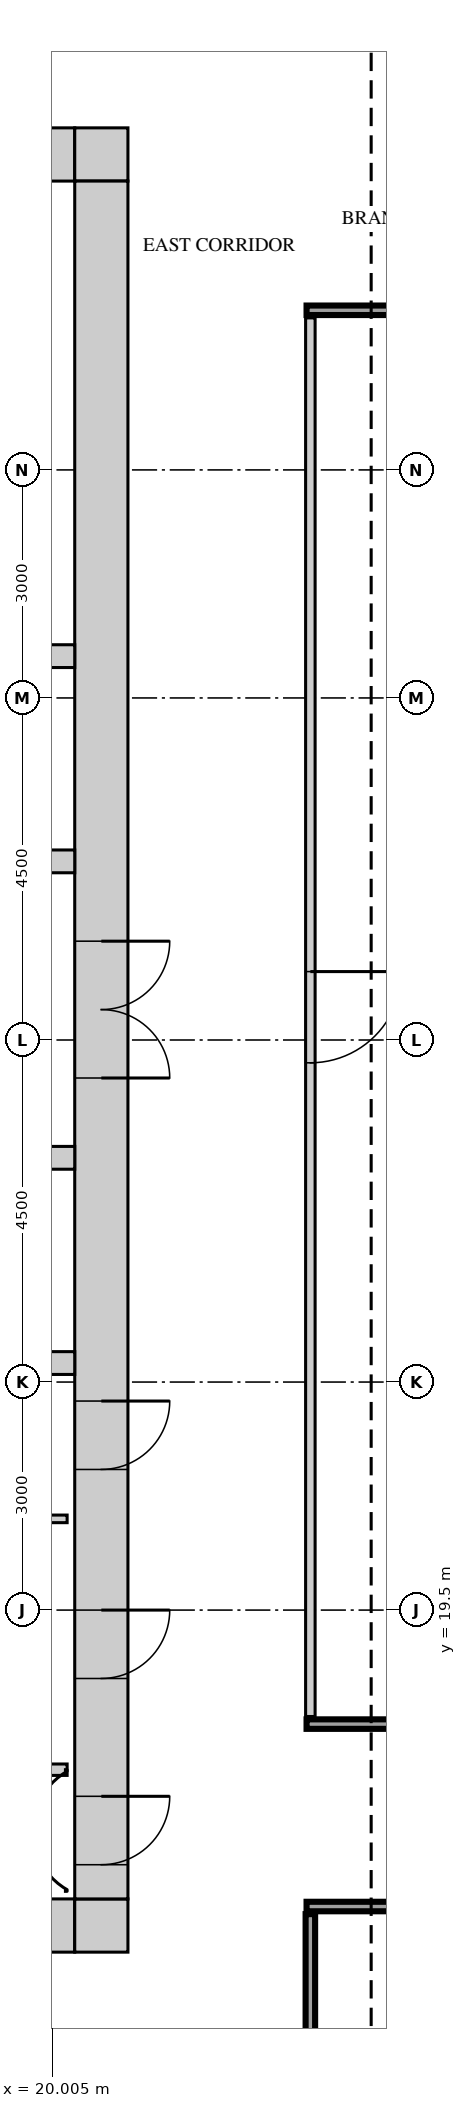
"""IFC4 building model, lengths in metres.
Left out: names, types, materials, properties, quantities, classifications, styles, units other than length and angle.
Written with IfcOpenShell. Run it as: python <this file> out.ifc"""

import sys

from ifc_helpers import new_model, si_unit, direction, frame, frame_2d, origin, place, context, subcontext, project, spatial, rectangle, extrude, source, transform, mapped, element, fill, save


model = new_model("IFC4")
c1 = context("Model", 3, precision=1e-05, world=origin(), true_north=direction((0.0, 1.0)))
c2 = subcontext(c1, "Body", "Model", "MODEL_VIEW")
j1 = project(units=[si_unit("LENGTHUNIT", "METRE"), si_unit("PLANEANGLEUNIT", "RADIAN")], contexts=[c1])
p1 = place(None, origin())
s1 = spatial("IfcSite", under=j1, at=p1, CompositionType="ELEMENT")
p2 = place(p1, origin())
s2 = spatial("IfcBuilding", under=s1, at=p2, CompositionType="ELEMENT")
p3 = place(p2, frame((0.0, 0.0, 230.2)))
s3 = spatial("IfcBuildingStorey", under=s2, at=p3, CompositionType="ELEMENT", Elevation=230.2)
m1 = source(origin(), c2, "Body", "SweptSolid", [
    extrude(rectangle(XDim=13.6, YDim=0.7, at=frame_2d((6.8, 0.0))), origin(), (0.0, 0.0, 1.0), 3.75),
])
p4 = place(p3, frame((6.7, 38.65, 0.0), z_axis=(0.0, 0.0, 1.0), x_axis=(1.0, 0.0, 0.0)))
e1 = element("IfcWall", 1, at=p4, inside=s3, PredefinedType="SHEAR", context=c2, shape_type="MappedRepresentation", body=[
    mapped(m1, transform((0.0, 0.0, 0.0))),
])
m2 = source(origin(), c2, "Body", "SweptSolid", [
    extrude(rectangle(XDim=0.9, YDim=2.1, at=frame_2d((0.45, 1.05))), frame((0.0, 0.36, 0.0), z_axis=(0.0, -1.0, 0.0), x_axis=(1.0, 0.0, 0.0)), (0.0, 0.0, 1.0), 0.72),
])
p5 = place(p4, frame((3.0, 0.0, 0.0)))
e2 = element("IfcOpeningElement", 2, at=p5, cuts=e1, PredefinedType="OPENING", context=c2, shape_type="MappedRepresentation", body=[
    mapped(m2, transform((0.0, 0.0, 0.0))),
])
p6 = place(p4, frame((9.7, 0.0, 0.0)))
e3 = element("IfcOpeningElement", 3, at=p6, cuts=e1, PredefinedType="OPENING", context=c2, shape_type="MappedRepresentation", body=[
    mapped(m2, transform((0.0, 0.0, 0.0))),
])
m3 = source(origin(), c2, "Body", "SweptSolid", [
    extrude(rectangle(XDim=0.7, YDim=0.7, at=frame_2d((0.35, 0.0))), origin(), (0.0, 0.0, 1.0), 3.75),
])
p7 = place(p3, frame((20.3, 38.65, 0.0), z_axis=(0.0, 0.0, 1.0), x_axis=(1.0, 0.0, 0.0)))
e4 = element("IfcWall", 4, at=p7, inside=s3, PredefinedType="SHEAR", context=c2, shape_type="MappedRepresentation", body=[
    mapped(m3, transform((0.0, 0.0, 0.0))),
])
p8 = place(p3, frame((6.7, 15.35, 0.0), z_axis=(0.0, 0.0, 1.0), x_axis=(1.0, 0.0, 0.0)))
e5 = element("IfcWall", 5, at=p8, inside=s3, PredefinedType="SHEAR", context=c2, shape_type="MappedRepresentation", body=[
    mapped(m1, transform((0.0, 0.0, 0.0))),
])
m4 = source(origin(), c2, "Body", "SweptSolid", [
    extrude(rectangle(XDim=1.2, YDim=2.1, at=frame_2d((0.6, 1.05))), frame((0.0, 0.36, 0.0), z_axis=(0.0, -1.0, 0.0), x_axis=(1.0, 0.0, 0.0)), (0.0, 0.0, 1.0), 0.72),
])
p9 = place(p8, frame((5.5, 0.0, 0.0)))
e6 = element("IfcOpeningElement", 6, at=p9, cuts=e5, PredefinedType="OPENING", context=c2, shape_type="MappedRepresentation", body=[
    mapped(m4, transform((0.0, 0.0, 0.0))),
])
p10 = place(p8, frame((2.15, 0.0, 0.0)))
e7 = element("IfcOpeningElement", 7, at=p10, cuts=e5, PredefinedType="OPENING", context=c2, shape_type="MappedRepresentation", body=[
    mapped(m4, transform((0.0, 0.0, 0.0))),
])
m5 = source(origin(), c2, "Body", "SweptSolid", [
    extrude(rectangle(XDim=1.0, YDim=2.1, at=frame_2d((0.5, 1.05))), frame((0.0, 0.36, 0.0), z_axis=(0.0, -1.0, 0.0), x_axis=(1.0, 0.0, 0.0)), (0.0, 0.0, 1.0), 0.72),
])
p11 = place(p8, frame((8.0, 0.0, 0.0)))
e8 = element("IfcOpeningElement", 8, at=p11, cuts=e5, PredefinedType="OPENING", context=c2, shape_type="MappedRepresentation", body=[
    mapped(m5, transform((0.0, 0.0, 0.0))),
])
p12 = place(p3, frame((20.3, 15.35, 0.0), z_axis=(0.0, 0.0, 1.0), x_axis=(1.0, 0.0, 0.0)))
e9 = element("IfcWall", 9, at=p12, inside=s3, PredefinedType="SHEAR", context=c2, shape_type="MappedRepresentation", body=[
    mapped(m3, transform((0.0, 0.0, 0.0))),
])
m6 = source(origin(), c2, "Body", "SweptSolid", [
    extrude(rectangle(XDim=22.6, YDim=0.7, at=frame_2d((11.3, 0.0))), origin(), (0.0, 0.0, 1.0), 3.75),
])
p13 = place(p3, frame((20.65, 15.7, 0.0), z_axis=(0.0, 0.0, 1.0), x_axis=(0.0, 1.0, 0.0)))
e10 = element("IfcWall", 10, at=p13, inside=s3, PredefinedType="SHEAR", context=c2, shape_type="MappedRepresentation", body=[
    mapped(m6, transform((0.0, 0.0, 0.0))),
])
m7 = source(origin(), c2, "Body", "SweptSolid", [
    extrude(rectangle(XDim=1.8, YDim=2.1, at=frame_2d((0.9, 1.05))), frame((0.0, 0.36, 0.0), z_axis=(0.0, -1.0, 0.0), x_axis=(1.0, 0.0, 0.0)), (0.0, 0.0, 1.0), 0.72),
])
p14 = place(p13, frame((10.8, 0.0, 0.0)))
e11 = element("IfcOpeningElement", 11, at=p14, cuts=e10, PredefinedType="OPENING", context=c2, shape_type="MappedRepresentation", body=[
    mapped(m7, transform((0.0, 0.0, 0.0))),
])
p15 = place(p13, frame((0.45, 0.0, 0.0)))
e12 = element("IfcOpeningElement", 12, at=p15, cuts=e10, PredefinedType="OPENING", context=c2, shape_type="MappedRepresentation", body=[
    mapped(m2, transform((0.0, 0.0, 0.0))),
])
p16 = place(p13, frame((2.9, 0.0, 0.0)))
e13 = element("IfcOpeningElement", 13, at=p16, cuts=e10, PredefinedType="OPENING", context=c2, shape_type="MappedRepresentation", body=[
    mapped(m2, transform((0.0, 0.0, 0.0))),
])
p17 = place(p13, frame((5.65, 0.0, 0.0)))
e14 = element("IfcOpeningElement", 14, at=p17, cuts=e10, PredefinedType="OPENING", context=c2, shape_type="MappedRepresentation", body=[
    mapped(m2, transform((0.0, 0.0, 0.0))),
])
m8 = source(origin(), c2, "Body", "SweptSolid", [
    extrude(rectangle(XDim=13.6, YDim=0.3, at=frame_2d((6.8, 0.0))), origin(), (0.0, 0.0, 1.0), 3.75),
])
for number, where, z_axis, x_axis in (
    (15, (6.7, 22.75, 0.0), (0.0, 0.0, 1.0), (1.0, 0.0, 0.0)),
    (16, (6.7, 32.05, 0.0), (0.0, 0.0, 1.0), (1.0, 0.0, 0.0)),
):
    element("IfcWall", number, at=place(p3, frame(where, z_axis=z_axis, x_axis=x_axis)), inside=s3, PredefinedType="STANDARD", context=c2, shape_type="MappedRepresentation", body=[
        mapped(m8, transform((0.0, 0.0, 0.0))),
    ])
p18 = place(p3, frame((6.7, 29.35, 0.0), z_axis=(0.0, 0.0, 1.0), x_axis=(1.0, 0.0, 0.0)))
e17 = element("IfcWall", 17, at=p18, inside=s3, PredefinedType="STANDARD", context=c2, shape_type="MappedRepresentation", body=[
    mapped(m8, transform((0.0, 0.0, 0.0))),
])
m9 = source(origin(), c2, "Body", "SweptSolid", [
    extrude(rectangle(XDim=1.2, YDim=2.1, at=frame_2d((0.6, 1.05))), frame((0.0, 0.16, 0.0), z_axis=(0.0, -1.0, 0.0), x_axis=(1.0, 0.0, 0.0)), (0.0, 0.0, 1.0), 0.32),
])
p19 = place(p18, frame((1.05, 0.0, 0.0)))
e18 = element("IfcOpeningElement", 18, at=p19, cuts=e17, PredefinedType="OPENING", context=c2, shape_type="MappedRepresentation", body=[
    mapped(m9, transform((0.0, 0.0, 0.0))),
])
p20 = place(p18, frame((3.6, 0.0, 0.0)))
e19 = element("IfcOpeningElement", 19, at=p20, cuts=e17, PredefinedType="OPENING", context=c2, shape_type="MappedRepresentation", body=[
    mapped(m9, transform((0.0, 0.0, 0.0))),
])
p21 = place(p18, frame((6.15, 0.0, 0.0)))
e20 = element("IfcOpeningElement", 20, at=p21, cuts=e17, PredefinedType="OPENING", context=c2, shape_type="MappedRepresentation", body=[
    mapped(m9, transform((0.0, 0.0, 0.0))),
])
p22 = place(p18, frame((8.7, 0.0, 0.0)))
e21 = element("IfcOpeningElement", 21, at=p22, cuts=e17, PredefinedType="OPENING", context=c2, shape_type="MappedRepresentation", body=[
    mapped(m9, transform((0.0, 0.0, 0.0))),
])
p23 = place(p18, frame((11.25, 0.0, 0.0)))
e22 = element("IfcOpeningElement", 22, at=p23, cuts=e17, PredefinedType="OPENING", context=c2, shape_type="MappedRepresentation", body=[
    mapped(m9, transform((0.0, 0.0, 0.0))),
])
p24 = place(p3, frame((6.7, 25.45, 0.0), z_axis=(0.0, 0.0, 1.0), x_axis=(1.0, 0.0, 0.0)))
e23 = element("IfcWall", 23, at=p24, inside=s3, PredefinedType="STANDARD", context=c2, shape_type="MappedRepresentation", body=[
    mapped(m8, transform((0.0, 0.0, 0.0))),
])
p25 = place(p24, frame((1.05, 0.0, 0.0)))
e24 = element("IfcOpeningElement", 24, at=p25, cuts=e23, PredefinedType="OPENING", context=c2, shape_type="MappedRepresentation", body=[
    mapped(m9, transform((0.0, 0.0, 0.0))),
])
p26 = place(p24, frame((3.6, 0.0, 0.0)))
e25 = element("IfcOpeningElement", 25, at=p26, cuts=e23, PredefinedType="OPENING", context=c2, shape_type="MappedRepresentation", body=[
    mapped(m9, transform((0.0, 0.0, 0.0))),
])
p27 = place(p24, frame((6.15, 0.0, 0.0)))
e26 = element("IfcOpeningElement", 26, at=p27, cuts=e23, PredefinedType="OPENING", context=c2, shape_type="MappedRepresentation", body=[
    mapped(m9, transform((0.0, 0.0, 0.0))),
])
p28 = place(p24, frame((8.7, 0.0, 0.0)))
e27 = element("IfcOpeningElement", 27, at=p28, cuts=e23, PredefinedType="OPENING", context=c2, shape_type="MappedRepresentation", body=[
    mapped(m9, transform((0.0, 0.0, 0.0))),
])
p29 = place(p24, frame((11.25, 0.0, 0.0)))
e28 = element("IfcOpeningElement", 28, at=p29, cuts=e23, PredefinedType="OPENING", context=c2, shape_type="MappedRepresentation", body=[
    mapped(m9, transform((0.0, 0.0, 0.0))),
])
m10 = source(origin(), c2, "Body", "SweptSolid", [
    extrude(rectangle(XDim=10.85, YDim=0.125, at=frame_2d((5.425, 0.0))), origin(), (0.0, 0.0, 1.0), 3.8),
])
p30 = place(p3, frame((23.4, 4.65, 0.0), z_axis=(0.0, 0.0, 1.0), x_axis=(0.0, 1.0, 0.0)))
e29 = element("IfcWall", 29, at=p30, inside=s3, PredefinedType="PARTITIONING", context=c2, shape_type="MappedRepresentation", body=[
    mapped(m10, transform((0.0, 0.0, 0.0))),
])
m11 = source(origin(), c2, "Body", "SweptSolid", [
    extrude(rectangle(XDim=0.9, YDim=2.1, at=frame_2d((0.45, 1.05))), frame((0.0, 0.073, 0.0), z_axis=(0.0, -1.0, 0.0), x_axis=(1.0, 0.0, 0.0)), (0.0, 0.0, 1.0), 0.145),
])
p31 = place(p30, frame((4.5, 0.0, 0.0)))
e30 = element("IfcOpeningElement", 30, at=p31, cuts=e29, PredefinedType="OPENING", context=c2, shape_type="MappedRepresentation", body=[
    mapped(m11, transform((0.0, 0.0, 0.0))),
])
m12 = source(origin(), c2, "Body", "SweptSolid", [
    extrude(rectangle(XDim=26.0, YDim=0.125, at=frame_2d((13.0, 0.0))), origin(), (0.0, 0.0, 1.0), 3.8),
])
p32 = place(p3, frame((23.35, 15.6, 0.0), z_axis=(0.0, 0.0, 1.0), x_axis=(1.0, 0.0, 0.0)))
e31 = element("IfcWall", 31, at=p32, inside=s3, PredefinedType="PARTITIONING", context=c2, shape_type="MappedRepresentation", body=[
    mapped(m12, transform((0.0, 0.0, 0.0))),
])
p33 = place(p32, frame((4.05, 0.0, 0.0)))
e32 = element("IfcOpeningElement", 32, at=p33, cuts=e31, PredefinedType="OPENING", context=c2, shape_type="MappedRepresentation", body=[
    mapped(m11, transform((0.0, 0.0, 0.0))),
])
m13 = source(origin(), c2, "Body", "SweptSolid", [
    extrude(rectangle(XDim=1.0, YDim=2.1, at=frame_2d((0.5, 1.05))), frame((0.0, 0.073, 0.0), z_axis=(0.0, -1.0, 0.0), x_axis=(1.0, 0.0, 0.0)), (0.0, 0.0, 1.0), 0.145),
])
p34 = place(p32, frame((6.85, 0.0, 0.0)))
e33 = element("IfcOpeningElement", 33, at=p34, cuts=e31, PredefinedType="OPENING", context=c2, shape_type="MappedRepresentation", body=[
    mapped(m13, transform((0.0, 0.0, 0.0))),
])
p35 = place(p32, frame((9.25, 0.0, 0.0)))
e34 = element("IfcOpeningElement", 34, at=p35, cuts=e31, PredefinedType="OPENING", context=c2, shape_type="MappedRepresentation", body=[
    mapped(m11, transform((0.0, 0.0, 0.0))),
])
p36 = place(p32, frame((15.1, 0.0, 0.0)))
e35 = element("IfcOpeningElement", 35, at=p36, cuts=e31, PredefinedType="OPENING", context=c2, shape_type="MappedRepresentation", body=[
    mapped(m11, transform((0.0, 0.0, 0.0))),
])
p37 = place(p32, frame((22.6, 0.0, 0.0)))
e36 = element("IfcOpeningElement", 36, at=p37, cuts=e31, PredefinedType="OPENING", context=c2, shape_type="MappedRepresentation", body=[
    mapped(m11, transform((0.0, 0.0, 0.0))),
])
m14 = source(origin(), c2, "Body", "SweptSolid", [
    extrude(rectangle(XDim=4.0, YDim=0.15, at=frame_2d((2.0, 0.0))), origin(), (0.0, 0.0, 1.0), 3.8),
])
p38 = place(p3, frame((16.2, 17.4, 0.0), z_axis=(0.0, 0.0, 1.0), x_axis=(1.0, 0.0, 0.0)))
e37 = element("IfcWall", 37, at=p38, inside=s3, PredefinedType="PARTITIONING", context=c2, shape_type="MappedRepresentation", body=[
    mapped(m14, transform((0.0, 0.0, 0.0))),
])
p39 = place(p3, frame((23.35, 18.0, 0.0), z_axis=(0.0, 0.0, 1.0), x_axis=(1.0, 0.0, 0.0)))
e38 = element("IfcWall", 38, at=p39, inside=s3, PredefinedType="PARTITIONING", context=c2, shape_type="MappedRepresentation", body=[
    mapped(m12, transform((0.0, 0.0, 0.0))),
])
m15 = source(origin(), c2, "Body", "SweptSolid", [
    extrude(rectangle(XDim=1.2, YDim=2.1, at=frame_2d((0.6, 1.05))), frame((0.0, 0.073, 0.0), z_axis=(0.0, -1.0, 0.0), x_axis=(1.0, 0.0, 0.0)), (0.0, 0.0, 1.0), 0.145),
])
p40 = place(p39, frame((11.55, 0.0, 0.0)))
e39 = element("IfcOpeningElement", 39, at=p40, cuts=e38, PredefinedType="OPENING", context=c2, shape_type="MappedRepresentation", body=[
    mapped(m15, transform((0.0, 0.0, 0.0))),
])
p41 = place(p39, frame((21.3, 0.0, 0.0)))
e40 = element("IfcOpeningElement", 40, at=p41, cuts=e38, PredefinedType="OPENING", context=c2, shape_type="MappedRepresentation", body=[
    mapped(m15, transform((0.0, 0.0, 0.0))),
])
m16 = source(origin(), c2, "Body", "SweptSolid", [
    extrude(rectangle(XDim=18.4, YDim=0.125, at=frame_2d((9.2, 0.0))), origin(), (0.0, 0.0, 1.0), 3.8),
])
p42 = place(p3, frame((23.4, 18.1, 0.0), z_axis=(0.0, 0.0, 1.0), x_axis=(0.0, 1.0, 0.0)))
e41 = element("IfcWall", 41, at=p42, inside=s3, PredefinedType="PARTITIONING", context=c2, shape_type="MappedRepresentation", body=[
    mapped(m16, transform((0.0, 0.0, 0.0))),
])
p43 = place(p42, frame((8.6, 0.0, 0.0)))
e42 = element("IfcOpeningElement", 42, at=p43, cuts=e41, PredefinedType="OPENING", context=c2, shape_type="MappedRepresentation", body=[
    mapped(m15, transform((0.0, 0.0, 0.0))),
])
m17 = source(origin(), c2, "Body", "SweptSolid", [
    extrude(rectangle(XDim=4.1, YDim=0.1, at=frame_2d((2.05, 0.0))), origin(), (0.0, 0.0, 1.0), 3.8),
])
p44 = place(p3, frame((16.1, 20.7, 0.0), z_axis=(0.0, 0.0, 1.0), x_axis=(1.0, 0.0, 0.0)))
e43 = element("IfcWall", 43, at=p44, inside=s3, PredefinedType="PARTITIONING", context=c2, shape_type="MappedRepresentation", body=[
    mapped(m17, transform((0.0, 0.0, 0.0))),
])
p45 = place(p3, frame((23.35, 36.6, 0.0), z_axis=(0.0, 0.0, 1.0), x_axis=(1.0, 0.0, 0.0)))
e44 = element("IfcWall", 44, at=p45, inside=s3, PredefinedType="PARTITIONING", context=c2, shape_type="MappedRepresentation", body=[
    mapped(m12, transform((0.0, 0.0, 0.0))),
])
m18 = source(origin(), c2, "Body", "SweptSolid", [
    extrude(rectangle(XDim=1.8, YDim=2.1, at=frame_2d((0.9, 1.05))), frame((0.0, 0.3, 0.0), z_axis=(0.0, -1.0, 0.0), x_axis=(1.0, 0.0, 0.0)), (0.0, 0.0, 1.0), 0.6),
])
p46 = place(p14, origin())
e45 = element("IfcDoor", 45, at=p46, inside=s3, OperationType="DOUBLE_DOOR_SINGLE_SWING", PredefinedType="DOOR", context=c2, shape_type="MappedRepresentation", body=[
    mapped(m18, transform((0.0, 0.0, 0.0))),
])
fill(e11, e45)
m19 = source(origin(), c2, "Body", "SweptSolid", [
    extrude(rectangle(XDim=0.9, YDim=2.1, at=frame_2d((0.45, 1.05))), frame((0.0, 0.3, 0.0), z_axis=(0.0, -1.0, 0.0), x_axis=(1.0, 0.0, 0.0)), (0.0, 0.0, 1.0), 0.6),
])
p47 = place(p15, origin())
e46 = element("IfcDoor", 46, at=p47, inside=s3, OperationType="SINGLE_SWING_RIGHT", PredefinedType="DOOR", context=c2, shape_type="MappedRepresentation", body=[
    mapped(m19, transform((0.0, 0.0, 0.0))),
])
fill(e12, e46)
p48 = place(p16, origin())
e47 = element("IfcDoor", 47, at=p48, inside=s3, OperationType="SINGLE_SWING_RIGHT", PredefinedType="DOOR", context=c2, shape_type="MappedRepresentation", body=[
    mapped(m19, transform((0.0, 0.0, 0.0))),
])
fill(e13, e47)
p49 = place(p17, origin())
e48 = element("IfcDoor", 48, at=p49, inside=s3, OperationType="SINGLE_SWING_RIGHT", PredefinedType="DOOR", context=c2, shape_type="MappedRepresentation", body=[
    mapped(m19, transform((0.0, 0.0, 0.0))),
])
fill(e14, e48)
m20 = source(origin(), c2, "Body", "SweptSolid", [
    extrude(rectangle(XDim=1.2, YDim=2.1, at=frame_2d((0.6, 1.05))), frame((0.0, 0.025, 0.0), z_axis=(0.0, -1.0, 0.0), x_axis=(1.0, 0.0, 0.0)), (0.0, 0.0, 1.0), 0.05),
])
p50 = place(p43, origin())
e49 = element("IfcDoor", 49, at=p50, inside=s3, OperationType="SINGLE_SWING_RIGHT", PredefinedType="DOOR", context=c2, shape_type="MappedRepresentation", body=[
    mapped(m20, transform((0.0, 0.0, 0.0))),
])
fill(e42, e49)
save(model, sys.argv[1])
